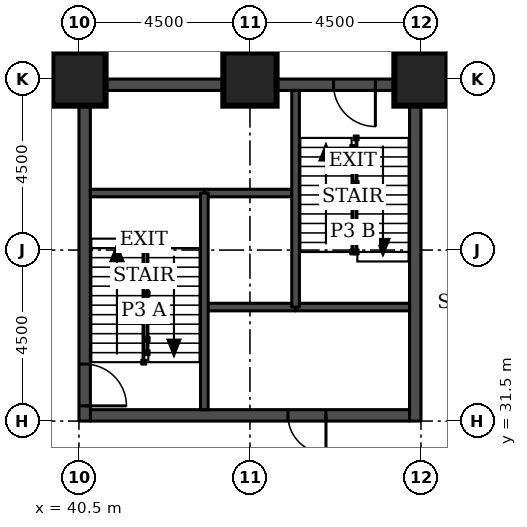
"""IFC4 building model, lengths in metres.
Left out: names, types, materials, properties, quantities, classifications, styles, units other than length and angle.
Written with IfcOpenShell. Run it as: python <this file> out.ifc"""

import sys

from ifc_helpers import new_model, si_unit, direction, frame, frame_2d, origin, origin_2d, place, context, subcontext, project, spatial, rectangle, extrude, element, fill, save


model = new_model("IFC4")
c1 = context("Model", 3, precision=1e-05, world=origin(), true_north=direction((0.0, 1.0)))
c2 = subcontext(c1, "Body", "Model", "MODEL_VIEW")
j1 = project(units=[si_unit("LENGTHUNIT", "METRE"), si_unit("PLANEANGLEUNIT", "RADIAN")], contexts=[c1])
p1 = place(None, origin())
s1 = spatial("IfcSite", under=j1, at=p1, CompositionType="ELEMENT")
p2 = place(p1, origin())
s2 = spatial("IfcBuilding", under=s1, at=p2, CompositionType="ELEMENT")
p3 = place(p2, frame((0.0, 0.0, -9.0)))
s3 = spatial("IfcBuildingStorey", under=s2, at=p3, CompositionType="ELEMENT", Elevation=-9.0)
for number, where, z_axis, x_axis in (
    (1, (40.5, 40.5, 0.0), (0.0, 0.0, 1.0), (1.0, 0.0, 0.0)),
    (2, (45.0, 40.5, 0.0), (0.0, 0.0, 1.0), (1.0, 0.0, 0.0)),
    (3, (49.5, 40.5, 0.0), (0.0, 0.0, 1.0), (1.0, 0.0, 0.0)),
):
    element("IfcColumn", number, at=place(p3, frame(where, z_axis=z_axis, x_axis=x_axis)), inside=s3, PredefinedType="COLUMN", context=c2, shape_type="SweptSolid", body=[
        extrude(rectangle(XDim=1.4, YDim=1.4, at=origin_2d()), origin(), (0.0, 0.0, 1.0), 4.5),
    ])
p4 = place(p3, frame((40.8, 31.65, 0.0), z_axis=(0.0, 0.0, 1.0), x_axis=(1.0, 0.0, 0.0)))
e4 = element("IfcWall", 4, at=p4, inside=s3, PredefinedType="SHEAR", context=c2, shape_type="SweptSolid", body=[
    extrude(rectangle(XDim=8.4, YDim=0.3, at=frame_2d((4.2, 0.0))), origin(), (0.0, 0.0, 1.0), 4.5),
])
p5 = place(p4, frame((5.2, 0.0, 0.0)))
e5 = element("IfcOpeningElement", 5, at=p5, cuts=e4, PredefinedType="OPENING", context=c2, shape_type="SweptSolid", body=[
    extrude(rectangle(XDim=1.0, YDim=2.1, at=frame_2d((0.5, 1.05))), frame((0.0, 0.16, 0.0), z_axis=(0.0, -1.0, 0.0), x_axis=(1.0, 0.0, 0.0)), (0.0, 0.0, 1.0), 0.32),
])
p6 = place(p3, frame((40.8, 40.35, 0.0), z_axis=(0.0, 0.0, 1.0), x_axis=(1.0, 0.0, 0.0)))
e6 = element("IfcWall", 6, at=p6, inside=s3, PredefinedType="SHEAR", context=c2, shape_type="SweptSolid", body=[
    extrude(rectangle(XDim=8.4, YDim=0.3, at=frame_2d((4.2, 0.0))), origin(), (0.0, 0.0, 1.0), 4.5),
])
p7 = place(p6, frame((6.4, 0.0, 0.0)))
e7 = element("IfcOpeningElement", 7, at=p7, cuts=e6, PredefinedType="OPENING", context=c2, shape_type="SweptSolid", body=[
    extrude(rectangle(XDim=1.1, YDim=2.1, at=frame_2d((0.55, 1.05))), frame((0.0, 0.16, 0.0), z_axis=(0.0, -1.0, 0.0), x_axis=(1.0, 0.0, 0.0)), (0.0, 0.0, 1.0), 0.32),
])
p8 = place(p3, frame((40.65, 31.5, 0.0), z_axis=(0.0, 0.0, 1.0), x_axis=(0.0, 1.0, 0.0)))
e8 = element("IfcWall", 8, at=p8, inside=s3, PredefinedType="SHEAR", context=c2, shape_type="SweptSolid", body=[
    extrude(rectangle(XDim=9.0, YDim=0.3, at=frame_2d((4.5, 0.0))), origin(), (0.0, 0.0, 1.0), 4.5),
])
p9 = place(p8, frame((0.4, 0.0, 0.0)))
e9 = element("IfcOpeningElement", 9, at=p9, cuts=e8, PredefinedType="OPENING", context=c2, shape_type="SweptSolid", body=[
    extrude(rectangle(XDim=1.1, YDim=2.1, at=frame_2d((0.55, 1.05))), frame((0.0, 0.16, 0.0), z_axis=(0.0, -1.0, 0.0), x_axis=(1.0, 0.0, 0.0)), (0.0, 0.0, 1.0), 0.32),
])
p10 = place(p3, frame((49.35, 31.5, 0.0), z_axis=(0.0, 0.0, 1.0), x_axis=(0.0, 1.0, 0.0)))
e10 = element("IfcWall", 10, at=p10, inside=s3, PredefinedType="SHEAR", context=c2, shape_type="SweptSolid", body=[
    extrude(rectangle(XDim=9.0, YDim=0.3, at=frame_2d((4.5, 0.0))), origin(), (0.0, 0.0, 1.0), 4.5),
])
p11 = place(p3, frame((43.8, 34.5, 0.0), z_axis=(0.0, 0.0, 1.0), x_axis=(1.0, 0.0, 0.0)))
e11 = element("IfcWall", 11, at=p11, inside=s3, PredefinedType="SOLIDWALL", context=c2, shape_type="SweptSolid", body=[
    extrude(rectangle(XDim=2.4, YDim=0.2, at=frame_2d((1.2, 0.0))), origin(), (0.0, 0.0, 1.0), 4.1),
])
p12 = place(p3, frame((46.2, 34.5, 0.0), z_axis=(0.0, 0.0, 1.0), x_axis=(1.0, 0.0, 0.0)))
e12 = element("IfcWall", 12, at=p12, inside=s3, PredefinedType="SOLIDWALL", context=c2, shape_type="SweptSolid", body=[
    extrude(rectangle(XDim=3.0, YDim=0.2, at=frame_2d((1.5, 0.0))), origin(), (0.0, 0.0, 1.0), 4.1),
])
p13 = place(p3, frame((43.8, 37.5, 0.0), z_axis=(0.0, 0.0, 1.0), x_axis=(1.0, 0.0, 0.0)))
e13 = element("IfcWall", 13, at=p13, inside=s3, PredefinedType="SOLIDWALL", context=c2, shape_type="SweptSolid", body=[
    extrude(rectangle(XDim=2.4, YDim=0.2, at=frame_2d((1.2, 0.0))), origin(), (0.0, 0.0, 1.0), 4.5),
])
p14 = place(p3, frame((40.8, 37.5, 0.0), z_axis=(0.0, 0.0, 1.0), x_axis=(1.0, 0.0, 0.0)))
e14 = element("IfcWall", 14, at=p14, inside=s3, PredefinedType="SOLIDWALL", context=c2, shape_type="SweptSolid", body=[
    extrude(rectangle(XDim=3.0, YDim=0.2, at=frame_2d((1.5, 0.0))), origin(), (0.0, 0.0, 1.0), 4.1),
])
for number, where, z_axis, x_axis in (
    (15, (43.8, 31.8, 0.0), (0.0, 0.0, 1.0), (0.0, 1.0, 0.0)),
    (16, (46.2, 34.5, 0.0), (0.0, 0.0, 1.0), (0.0, 1.0, 0.0)),
):
    element("IfcWall", number, at=place(p3, frame(where, z_axis=z_axis, x_axis=x_axis)), inside=s3, PredefinedType="SOLIDWALL", context=c2, shape_type="SweptSolid", body=[
        extrude(rectangle(XDim=5.7, YDim=0.2, at=frame_2d((2.85, 0.0))), origin(), (0.0, 0.0, 1.0), 4.1),
    ])
p15 = place(p9, frame((1.1, 0.0, 0.0), z_axis=(0.0, 0.0, 1.0), x_axis=(-1.0, 0.0, 0.0)))
e17 = element("IfcDoor", 17, at=p15, inside=s3, OperationType="SINGLE_SWING_RIGHT", PredefinedType="DOOR", context=c2, shape_type="SweptSolid", body=[
    extrude(rectangle(XDim=1.1, YDim=2.1, at=frame_2d((0.55, 1.05))), frame((0.0, 0.025, 0.0), z_axis=(0.0, -1.0, 0.0), x_axis=(1.0, 0.0, 0.0)), (0.0, 0.0, 1.0), 0.05),
])
fill(e9, e17)
p16 = place(p7, frame((1.1, 0.0, 0.0), z_axis=(0.0, 0.0, 1.0), x_axis=(-1.0, 0.0, 0.0)))
e18 = element("IfcDoor", 18, at=p16, inside=s3, OperationType="SINGLE_SWING_LEFT", PredefinedType="DOOR", context=c2, shape_type="SweptSolid", body=[
    extrude(rectangle(XDim=1.1, YDim=2.1, at=frame_2d((0.55, 1.05))), frame((0.0, 0.025, 0.0), z_axis=(0.0, -1.0, 0.0), x_axis=(1.0, 0.0, 0.0)), (0.0, 0.0, 1.0), 0.05),
])
fill(e7, e18)
p17 = place(p5, frame((1.0, 0.0, 0.0), z_axis=(0.0, 0.0, 1.0), x_axis=(-1.0, 0.0, 0.0)))
e19 = element("IfcDoor", 19, at=p17, inside=s3, OperationType="SINGLE_SWING_LEFT", PredefinedType="DOOR", context=c2, shape_type="SweptSolid", body=[
    extrude(rectangle(XDim=1.0, YDim=2.1, at=frame_2d((0.5, 1.05))), frame((0.0, 0.025, 0.0), z_axis=(0.0, -1.0, 0.0), x_axis=(1.0, 0.0, 0.0)), (0.0, 0.0, 1.0), 0.05),
])
fill(e5, e19)
save(model, sys.argv[1])
